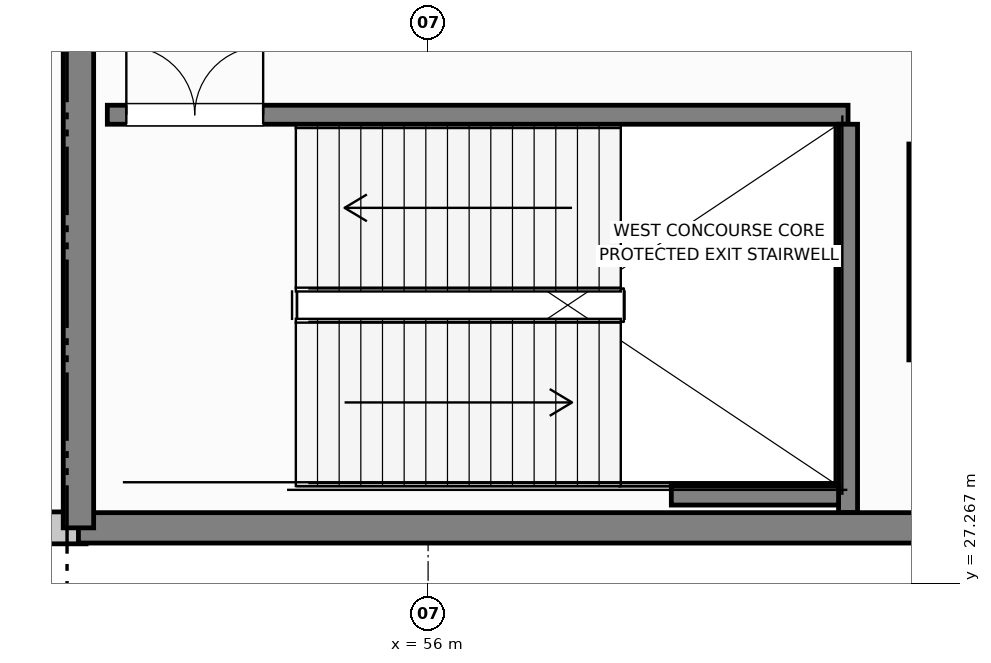
"""IFC4 building model, lengths in metres.
Left out: names, types, materials, properties, quantities, classifications, styles, units other than length and angle.
Written with IfcOpenShell. Run it as: python <this file> out.ifc"""

import sys

from ifc_helpers import new_model, si_unit, direction, frame, frame_2d, origin, place, context, subcontext, project, spatial, rectangle, extrude, element, fill, save


model = new_model("IFC4")
c1 = context("Model", 3, precision=1e-05, world=origin(), true_north=direction((0.0, 1.0)))
c2 = subcontext(c1, "Body", "Model", "MODEL_VIEW")
j1 = project(units=[si_unit("LENGTHUNIT", "METRE"), si_unit("PLANEANGLEUNIT", "RADIAN")], contexts=[c1])
p1 = place(None, origin())
s1 = spatial("IfcSite", under=j1, at=p1, CompositionType="ELEMENT")
p2 = place(p1, origin())
s2 = spatial("IfcBuilding", under=s1, at=p2, CompositionType="ELEMENT")
p3 = place(p2, frame((0.0, 0.0, 6.0)))
s3 = spatial("IfcBuildingStorey", under=s2, at=p3, CompositionType="ELEMENT", Elevation=6.0)
p4 = place(p3, frame((49.8, 28.0, 0.0), z_axis=(0.0, 0.0, 1.0), x_axis=(1.0, 0.0, 0.0)))
e1 = element("IfcWall", 1, at=p4, inside=s3, PredefinedType="STANDARD", context=c2, shape_type="SweptSolid", body=[
    extrude(rectangle(XDim=1.7, YDim=0.42, at=frame_2d((0.85, 0.0))), origin(), (0.0, 0.0, 1.0), 5.025),
])
p5 = place(p3, frame((62.45, 33.05, 0.0), z_axis=(0.0, 0.0, 1.0), x_axis=(0.0, -1.0, 0.0)))
e2 = element("IfcWall", 2, at=p5, inside=s3, PredefinedType="SOLIDWALL", context=c2, shape_type="SweptSolid", body=[
    extrude(rectangle(XDim=2.84, YDim=0.25, at=frame_2d((1.42, 0.0))), origin(), (0.0, 0.0, 1.0), 5.05),
])
p6 = place(p3, frame((51.78, 33.435, 0.0), z_axis=(0.0, 0.0, 1.0), x_axis=(1.0, 0.0, 0.0)))
e3 = element("IfcWall", 3, at=p6, inside=s3, PredefinedType="SOLIDWALL", context=c2, shape_type="SweptSolid", body=[
    extrude(rectangle(XDim=9.745, YDim=0.25, at=frame_2d((4.872, 0.0))), origin(), (0.0, 0.0, 1.0), 5.02),
])
p7 = place(p6, frame((0.25, 0.0, 0.0)))
e4 = element("IfcOpeningElement", 4, at=p7, cuts=e3, PredefinedType="OPENING", context=c2, shape_type="SweptSolid", body=[
    extrude(rectangle(XDim=1.8, YDim=2.25, at=frame_2d((0.9, 1.125))), frame((0.0, 0.135, 0.0), z_axis=(0.0, -1.0, 0.0), x_axis=(1.0, 0.0, 0.0)), (0.0, 0.0, 1.0), 0.27),
])
p8 = place(p3, frame((61.525, 28.2, 0.0), z_axis=(0.0, 0.0, 1.0), x_axis=(0.0, 1.0, 0.0)))
e5 = element("IfcWall", 5, at=p8, inside=s3, PredefinedType="SOLIDWALL", context=c2, shape_type="SweptSolid", body=[
    extrude(rectangle(XDim=5.11, YDim=0.25, at=frame_2d((2.555, 0.0))), origin(), (0.0, 0.0, 1.0), 5.02),
])
p9 = place(p3, frame((59.2, 28.425, 0.0), z_axis=(0.0, 0.0, 1.0), x_axis=(1.0, 0.0, 0.0)))
e6 = element("IfcWall", 6, at=p9, inside=s3, PredefinedType="SOLIDWALL", context=c2, shape_type="SweptSolid", body=[
    extrude(rectangle(XDim=2.2, YDim=0.25, at=frame_2d((1.1, 0.0))), origin(), (0.0, 0.0, 1.0), 5.02),
])
p10 = place(p3, frame((51.4, 28.0, 0.0), z_axis=(0.0, 0.0, 1.0), x_axis=(1.0, 0.0, 0.0)))
e7 = element("IfcWall", 7, at=p10, inside=s3, PredefinedType="SHEAR", context=c2, shape_type="SweptSolid", body=[
    extrude(rectangle(XDim=17.4, YDim=0.4, at=frame_2d((8.7, 0.0))), origin(), (0.0, 0.0, 1.0), 5.05),
])
p11 = place(p3, frame((51.4, 37.0, 0.0), z_axis=(0.0, 0.0, 1.0), x_axis=(0.0, -1.0, 0.0)))
e8 = element("IfcWall", 8, at=p11, inside=s3, PredefinedType="SHEAR", context=c2, shape_type="SweptSolid", body=[
    extrude(rectangle(XDim=9.0, YDim=0.4, at=frame_2d((4.5, 0.0))), origin(), (0.0, 0.0, 1.0), 5.05),
])
p12 = place(p7, origin())
e9 = element("IfcDoor", 9, at=p12, inside=s3, OperationType="DOUBLE_DOOR_SINGLE_SWING", PredefinedType="DOOR", context=c2, shape_type="SweptSolid", body=[
    extrude(rectangle(XDim=1.8, YDim=2.25, at=frame_2d((0.9, 1.125))), frame((0.0, 0.025, 0.0), z_axis=(0.0, -1.0, 0.0), x_axis=(1.0, 0.0, 0.0)), (0.0, 0.0, 1.0), 0.05),
])
fill(e4, e9)
save(model, sys.argv[1])
